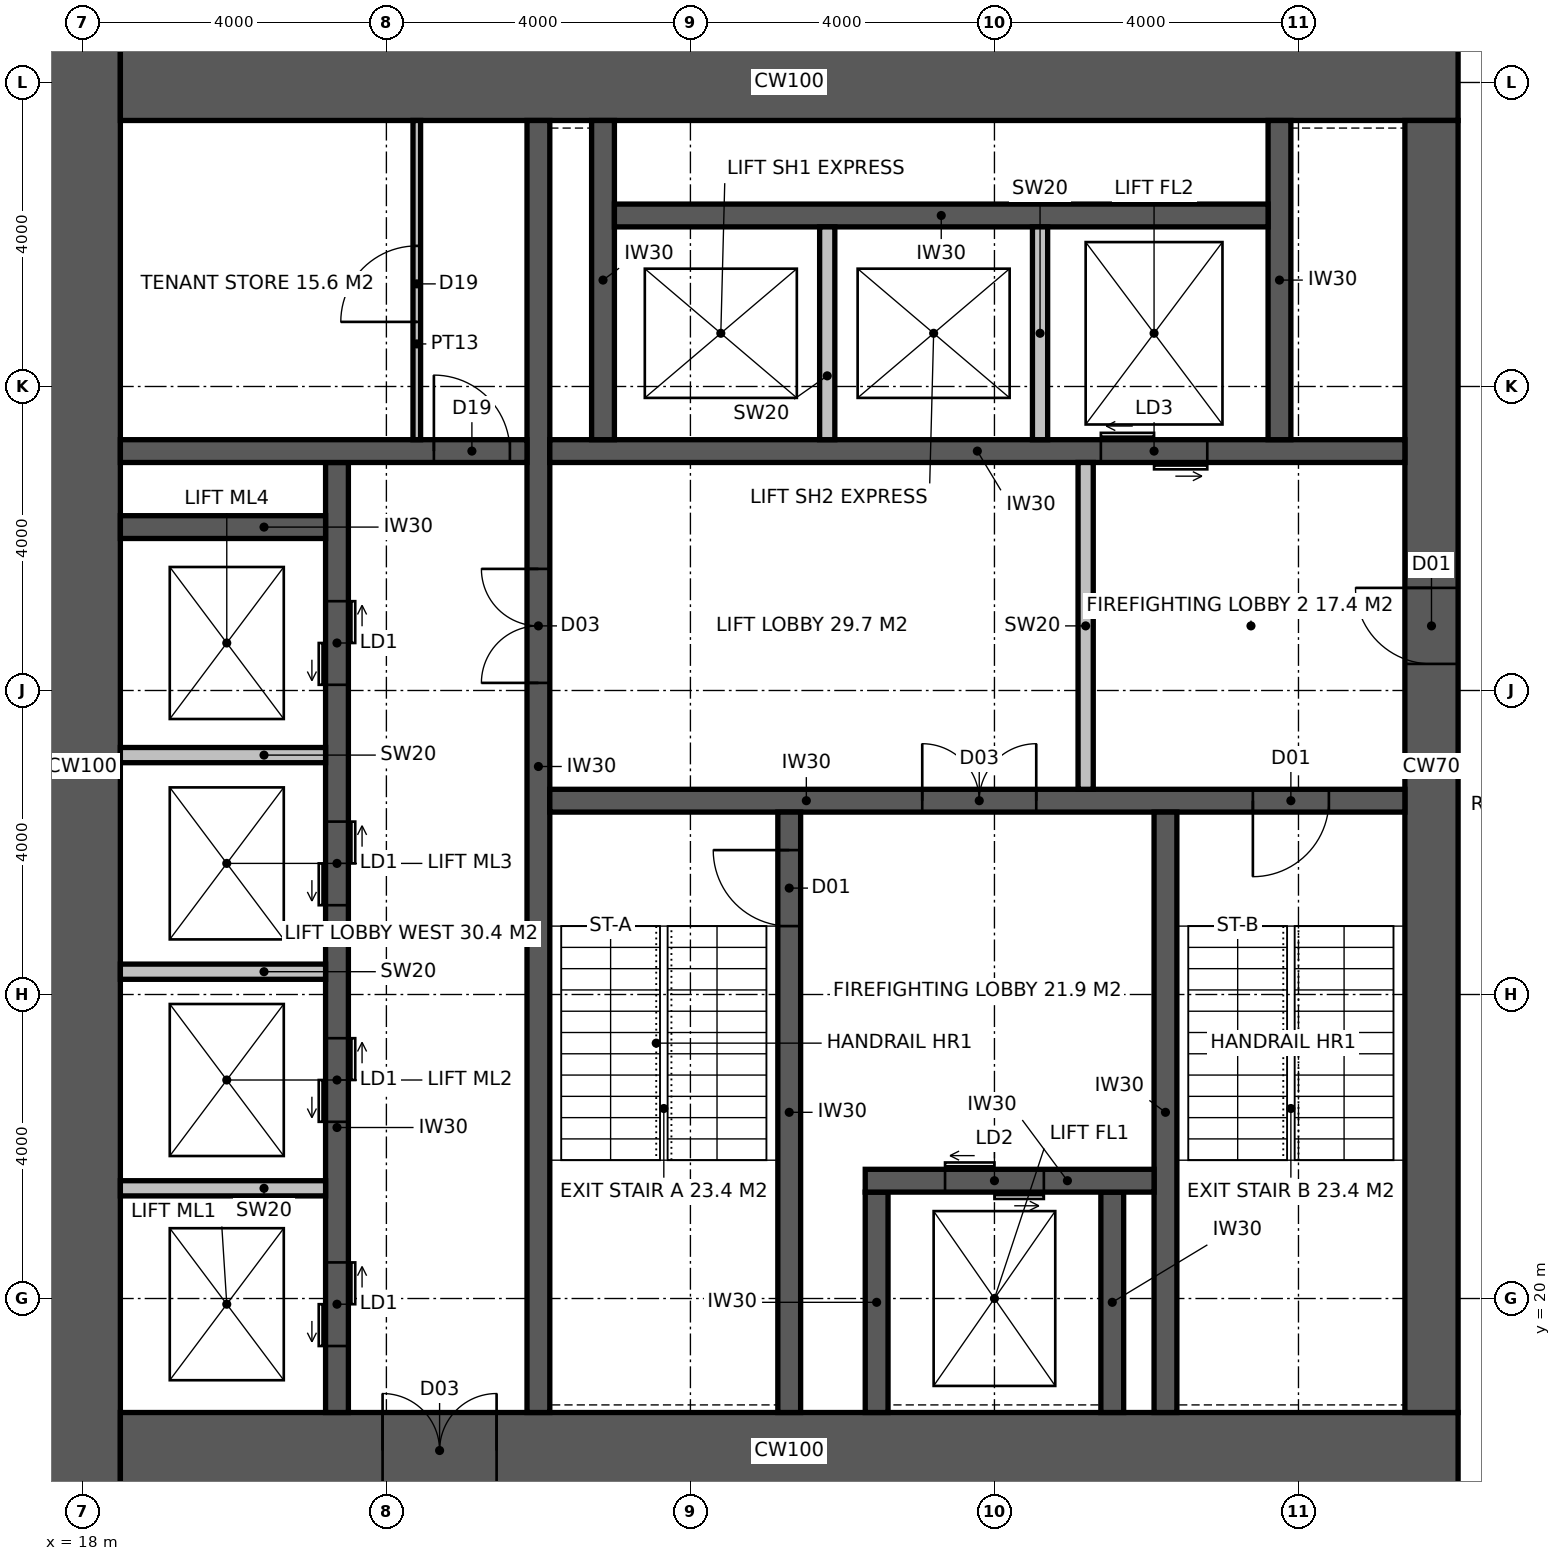
"""IFC4 building model, lengths in metres.
Left out: names, types, materials, properties, quantities, classifications, styles, units other than length and angle.
Written with IfcOpenShell. Run it as: python <this file> out.ifc"""

import sys

from ifc_helpers import new_model, si_unit, direction, frame, frame_2d, origin, place, context, subcontext, project, spatial, rectangle, extrude, element, fill, save


model = new_model("IFC4")
c1 = context("Model", 3, precision=1e-05, world=origin(), true_north=direction((0.0, 1.0)))
c2 = subcontext(c1, "Body", "Model", "MODEL_VIEW")
j1 = project(units=[si_unit("LENGTHUNIT", "METRE"), si_unit("PLANEANGLEUNIT", "RADIAN")], contexts=[c1])
p1 = place(None, origin())
s1 = spatial("IfcSite", under=j1, at=p1, CompositionType="ELEMENT")
p2 = place(p1, origin())
s2 = spatial("IfcBuilding", under=s1, at=p2, CompositionType="ELEMENT")
p3 = place(p2, frame((0.0, 0.0, 121.4)))
s3 = spatial("IfcBuildingStorey", under=s2, at=p3, CompositionType="ELEMENT", Elevation=121.4)
p4 = place(p3, frame((18.0, 17.5, -0.15), z_axis=(0.0, 0.0, 1.0), x_axis=(0.0, 1.0, 0.0)))
e1 = element("IfcWall", 1, at=p4, inside=s3, PredefinedType="SHEAR", context=c2, shape_type="SweptSolid", body=[
    extrude(rectangle(XDim=19.0, YDim=1.0, at=frame_2d((9.5, 0.0))), origin(), (0.0, 0.0, 1.0), 4.0),
])
p5 = place(p3, frame((18.5, 18.0, -0.15), z_axis=(0.0, 0.0, 1.0), x_axis=(1.0, 0.0, 0.0)))
e2 = element("IfcWall", 2, at=p5, inside=s3, PredefinedType="SHEAR", context=c2, shape_type="SweptSolid", body=[
    extrude(rectangle(XDim=17.6, YDim=1.0, at=frame_2d((8.8, 0.0))), origin(), (0.0, 0.0, 1.0), 4.0),
])
p6 = place(p5, frame((3.45, 0.0, 0.15)))
e3 = element("IfcOpeningElement", 3, at=p6, cuts=e2, PredefinedType="OPENING", context=c2, shape_type="SweptSolid", body=[
    extrude(rectangle(XDim=1.5, YDim=2.4, at=frame_2d((0.75, 1.2))), frame((0.0, 0.51, 0.0), z_axis=(0.0, -1.0, 0.0), x_axis=(1.0, 0.0, 0.0)), (0.0, 0.0, 1.0), 1.02),
])
p7 = place(p3, frame((18.5, 36.0, -0.15), z_axis=(0.0, 0.0, 1.0), x_axis=(1.0, 0.0, 0.0)))
e4 = element("IfcWall", 4, at=p7, inside=s3, PredefinedType="SHEAR", context=c2, shape_type="SweptSolid", body=[
    extrude(rectangle(XDim=17.6, YDim=1.0, at=frame_2d((8.8, 0.0))), origin(), (0.0, 0.0, 1.0), 4.0),
])
p8 = place(p3, frame((35.75, 18.5, -0.15), z_axis=(0.0, 0.0, 1.0), x_axis=(0.0, 1.0, 0.0)))
e5 = element("IfcWall", 5, at=p8, inside=s3, PredefinedType="SHEAR", context=c2, shape_type="SweptSolid", body=[
    extrude(rectangle(XDim=17.0, YDim=0.7, at=frame_2d((8.5, 0.0))), origin(), (0.0, 0.0, 1.0), 4.0),
])
p9 = place(p8, frame((9.85, 0.0, 0.15)))
e6 = element("IfcOpeningElement", 6, at=p9, cuts=e5, PredefinedType="OPENING", context=c2, shape_type="SweptSolid", body=[
    extrude(rectangle(XDim=1.0, YDim=2.2, at=frame_2d((0.5, 1.1))), frame((0.0, 0.36, 0.0), z_axis=(0.0, -1.0, 0.0), x_axis=(1.0, 0.0, 0.0)), (0.0, 0.0, 1.0), 0.72),
])
p10 = place(p3, frame((24.0, 18.5, -0.15), z_axis=(0.0, 0.0, 1.0), x_axis=(0.0, 1.0, 0.0)))
e7 = element("IfcWall", 7, at=p10, inside=s3, PredefinedType="SHEAR", context=c2, shape_type="SweptSolid", body=[
    extrude(rectangle(XDim=17.0, YDim=0.3, at=frame_2d((8.5, 0.0))), origin(), (0.0, 0.0, 1.0), 4.0),
])
p11 = place(p10, frame((9.6, 0.0, 0.15)))
e8 = element("IfcOpeningElement", 8, at=p11, cuts=e7, PredefinedType="OPENING", context=c2, shape_type="SweptSolid", body=[
    extrude(rectangle(XDim=1.5, YDim=2.4, at=frame_2d((0.75, 1.2))), frame((0.0, 0.16, 0.0), z_axis=(0.0, -1.0, 0.0), x_axis=(1.0, 0.0, 0.0)), (0.0, 0.0, 1.0), 0.32),
])
p12 = place(p3, frame((24.15, 26.55, -0.15), z_axis=(0.0, 0.0, 1.0), x_axis=(1.0, 0.0, 0.0)))
e9 = element("IfcWall", 9, at=p12, inside=s3, PredefinedType="SHEAR", context=c2, shape_type="SweptSolid", body=[
    extrude(rectangle(XDim=11.25, YDim=0.3, at=frame_2d((5.625, 0.0))), origin(), (0.0, 0.0, 1.0), 4.0),
])
p13 = place(p12, frame((9.25, 0.0, 0.15)))
e10 = element("IfcOpeningElement", 10, at=p13, cuts=e9, PredefinedType="OPENING", context=c2, shape_type="SweptSolid", body=[
    extrude(rectangle(XDim=1.0, YDim=2.2, at=frame_2d((0.5, 1.1))), frame((0.0, 0.16, 0.0), z_axis=(0.0, -1.0, 0.0), x_axis=(1.0, 0.0, 0.0)), (0.0, 0.0, 1.0), 0.32),
])
p14 = place(p12, frame((4.9, 0.0, 0.15)))
e11 = element("IfcOpeningElement", 11, at=p14, cuts=e9, PredefinedType="OPENING", context=c2, shape_type="SweptSolid", body=[
    extrude(rectangle(XDim=1.5, YDim=2.4, at=frame_2d((0.75, 1.2))), frame((0.0, 0.16, 0.0), z_axis=(0.0, -1.0, 0.0), x_axis=(1.0, 0.0, 0.0)), (0.0, 0.0, 1.0), 0.32),
])
p15 = place(p3, frame((27.3, 18.5, -0.15), z_axis=(0.0, 0.0, 1.0), x_axis=(0.0, 1.0, 0.0)))
e12 = element("IfcWall", 12, at=p15, inside=s3, PredefinedType="SHEAR", context=c2, shape_type="SweptSolid", body=[
    extrude(rectangle(XDim=7.9, YDim=0.3, at=frame_2d((3.95, 0.0))), origin(), (0.0, 0.0, 1.0), 4.0),
])
p16 = place(p15, frame((6.4, 0.0, 0.15)))
e13 = element("IfcOpeningElement", 13, at=p16, cuts=e12, PredefinedType="OPENING", context=c2, shape_type="SweptSolid", body=[
    extrude(rectangle(XDim=1.0, YDim=2.2, at=frame_2d((0.5, 1.1))), frame((0.0, 0.16, 0.0), z_axis=(0.0, -1.0, 0.0), x_axis=(1.0, 0.0, 0.0)), (0.0, 0.0, 1.0), 0.32),
])
p17 = place(p3, frame((32.25, 18.5, -0.15), z_axis=(0.0, 0.0, 1.0), x_axis=(0.0, 1.0, 0.0)))
e14 = element("IfcWall", 14, at=p17, inside=s3, PredefinedType="SHEAR", context=c2, shape_type="SweptSolid", body=[
    extrude(rectangle(XDim=7.9, YDim=0.3, at=frame_2d((3.95, 0.0))), origin(), (0.0, 0.0, 1.0), 4.0),
])
for number, where, z_axis, x_axis in (
    (15, (28.45, 18.5, -0.15), (0.0, 0.0, 1.0), (0.0, 1.0, 0.0)),
    (16, (31.55, 18.5, -0.15), (0.0, 0.0, 1.0), (0.0, 1.0, 0.0)),
):
    element("IfcWall", number, at=place(p3, frame(where, z_axis=z_axis, x_axis=x_axis)), inside=s3, PredefinedType="SHEAR", context=c2, shape_type="SweptSolid", body=[
        extrude(rectangle(XDim=2.9, YDim=0.3, at=frame_2d((1.45, 0.0))), origin(), (0.0, 0.0, 1.0), 4.0),
    ])
p18 = place(p3, frame((28.3, 21.55, -0.15), z_axis=(0.0, 0.0, 1.0), x_axis=(1.0, 0.0, 0.0)))
e17 = element("IfcWall", 17, at=p18, inside=s3, PredefinedType="SHEAR", context=c2, shape_type="SweptSolid", body=[
    extrude(rectangle(XDim=3.8, YDim=0.3, at=frame_2d((1.9, 0.0))), origin(), (0.0, 0.0, 1.0), 4.0),
])
p19 = place(p18, frame((1.05, 0.0, 0.15)))
e18 = element("IfcOpeningElement", 18, at=p19, cuts=e17, PredefinedType="OPENING", context=c2, shape_type="SweptSolid", body=[
    extrude(rectangle(XDim=1.3, YDim=2.4, at=frame_2d((0.65, 1.2))), frame((0.0, 0.16, 0.0), z_axis=(0.0, -1.0, 0.0), x_axis=(1.0, 0.0, 0.0)), (0.0, 0.0, 1.0), 0.32),
])
p20 = place(p3, frame((24.15, 31.15, -0.15), z_axis=(0.0, 0.0, 1.0), x_axis=(1.0, 0.0, 0.0)))
e19 = element("IfcWall", 19, at=p20, inside=s3, PredefinedType="SHEAR", context=c2, shape_type="SweptSolid", body=[
    extrude(rectangle(XDim=11.25, YDim=0.3, at=frame_2d((5.625, 0.0))), origin(), (0.0, 0.0, 1.0), 4.0),
])
p21 = place(p20, frame((7.25, 0.0, 0.15)))
e20 = element("IfcOpeningElement", 20, at=p21, cuts=e19, PredefinedType="OPENING", context=c2, shape_type="SweptSolid", body=[
    extrude(rectangle(XDim=1.4, YDim=2.4, at=frame_2d((0.7, 1.2))), frame((0.0, 0.16, 0.0), z_axis=(0.0, -1.0, 0.0), x_axis=(1.0, 0.0, 0.0)), (0.0, 0.0, 1.0), 0.32),
])
p22 = place(p3, frame((21.35, 18.5, -0.15), z_axis=(0.0, 0.0, 1.0), x_axis=(0.0, 1.0, 0.0)))
e21 = element("IfcWall", 21, at=p22, inside=s3, PredefinedType="SHEAR", context=c2, shape_type="SweptSolid", body=[
    extrude(rectangle(XDim=12.5, YDim=0.3, at=frame_2d((6.25, 0.0))), origin(), (0.0, 0.0, 1.0), 4.0),
])
p23 = place(p22, frame((0.875, 0.0, 0.15)))
e22 = element("IfcOpeningElement", 22, at=p23, cuts=e21, PredefinedType="OPENING", context=c2, shape_type="SweptSolid", body=[
    extrude(rectangle(XDim=1.1, YDim=2.2, at=frame_2d((0.55, 1.1))), frame((0.0, 0.16, 0.0), z_axis=(0.0, -1.0, 0.0), x_axis=(1.0, 0.0, 0.0)), (0.0, 0.0, 1.0), 0.32),
])
p24 = place(p22, frame((3.825, 0.0, 0.15)))
e23 = element("IfcOpeningElement", 23, at=p24, cuts=e21, PredefinedType="OPENING", context=c2, shape_type="SweptSolid", body=[
    extrude(rectangle(XDim=1.1, YDim=2.2, at=frame_2d((0.55, 1.1))), frame((0.0, 0.16, 0.0), z_axis=(0.0, -1.0, 0.0), x_axis=(1.0, 0.0, 0.0)), (0.0, 0.0, 1.0), 0.32),
])
p25 = place(p22, frame((6.675, 0.0, 0.15)))
e24 = element("IfcOpeningElement", 24, at=p25, cuts=e21, PredefinedType="OPENING", context=c2, shape_type="SweptSolid", body=[
    extrude(rectangle(XDim=1.1, YDim=2.2, at=frame_2d((0.55, 1.1))), frame((0.0, 0.16, 0.0), z_axis=(0.0, -1.0, 0.0), x_axis=(1.0, 0.0, 0.0)), (0.0, 0.0, 1.0), 0.32),
])
p26 = place(p22, frame((9.575, 0.0, 0.15)))
e25 = element("IfcOpeningElement", 25, at=p26, cuts=e21, PredefinedType="OPENING", context=c2, shape_type="SweptSolid", body=[
    extrude(rectangle(XDim=1.1, YDim=2.2, at=frame_2d((0.55, 1.1))), frame((0.0, 0.16, 0.0), z_axis=(0.0, -1.0, 0.0), x_axis=(1.0, 0.0, 0.0)), (0.0, 0.0, 1.0), 0.32),
])
p27 = place(p3, frame((18.5, 31.15, -0.15), z_axis=(0.0, 0.0, 1.0), x_axis=(1.0, 0.0, 0.0)))
e26 = element("IfcWall", 26, at=p27, inside=s3, PredefinedType="SHEAR", context=c2, shape_type="SweptSolid", body=[
    extrude(rectangle(XDim=5.35, YDim=0.3, at=frame_2d((2.675, 0.0))), origin(), (0.0, 0.0, 1.0), 4.0),
])
p28 = place(p27, frame((4.125, 0.0, 0.15)))
e27 = element("IfcOpeningElement", 27, at=p28, cuts=e26, PredefinedType="OPENING", context=c2, shape_type="SweptSolid", body=[
    extrude(rectangle(XDim=1.0, YDim=2.2, at=frame_2d((0.5, 1.1))), frame((0.0, 0.16, 0.0), z_axis=(0.0, -1.0, 0.0), x_axis=(1.0, 0.0, 0.0)), (0.0, 0.0, 1.0), 0.32),
])
p29 = place(p3, frame((18.5, 30.15, -0.15), z_axis=(0.0, 0.0, 1.0), x_axis=(1.0, 0.0, 0.0)))
e28 = element("IfcWall", 28, at=p29, inside=s3, PredefinedType="SHEAR", context=c2, shape_type="SweptSolid", body=[
    extrude(rectangle(XDim=2.7, YDim=0.3, at=frame_2d((1.35, 0.0))), origin(), (0.0, 0.0, 1.0), 4.0),
])
for number, where, z_axis, x_axis in (
    (29, (24.85, 31.3, -0.15), (0.0, 0.0, 1.0), (0.0, 1.0, 0.0)),
    (30, (33.75, 31.3, -0.15), (0.0, 0.0, 1.0), (0.0, 1.0, 0.0)),
):
    element("IfcWall", number, at=place(p3, frame(where, z_axis=z_axis, x_axis=x_axis)), inside=s3, PredefinedType="SHEAR", context=c2, shape_type="SweptSolid", body=[
        extrude(rectangle(XDim=4.2, YDim=0.3, at=frame_2d((2.1, 0.0))), origin(), (0.0, 0.0, 1.0), 4.0),
    ])
p30 = place(p3, frame((25.0, 34.25, -0.15), z_axis=(0.0, 0.0, 1.0), x_axis=(1.0, 0.0, 0.0)))
e31 = element("IfcWall", 31, at=p30, inside=s3, PredefinedType="SHEAR", context=c2, shape_type="SweptSolid", body=[
    extrude(rectangle(XDim=8.6, YDim=0.3, at=frame_2d((4.3, 0.0))), origin(), (0.0, 0.0, 1.0), 4.0),
])
for number, where, z_axis, x_axis in (
    (32, (27.8, 31.3, -0.15), (0.0, 0.0, 1.0), (0.0, 1.0, 0.0)),
    (33, (30.6, 31.3, -0.15), (0.0, 0.0, 1.0), (0.0, 1.0, 0.0)),
):
    element("IfcWall", number, at=place(p3, frame(where, z_axis=z_axis, x_axis=x_axis)), inside=s3, PredefinedType="SOLIDWALL", context=c2, shape_type="SweptSolid", body=[
        extrude(rectangle(XDim=2.8, YDim=0.2, at=frame_2d((1.4, 0.0))), origin(), (0.0, 0.0, 1.0), 4.0),
    ])
for number, where, z_axis, x_axis in (
    (34, (18.5, 21.45, -0.15), (0.0, 0.0, 1.0), (1.0, 0.0, 0.0)),
    (35, (18.5, 24.3, -0.15), (0.0, 0.0, 1.0), (1.0, 0.0, 0.0)),
    (36, (18.5, 27.15, -0.15), (0.0, 0.0, 1.0), (1.0, 0.0, 0.0)),
):
    element("IfcWall", number, at=place(p3, frame(where, z_axis=z_axis, x_axis=x_axis)), inside=s3, PredefinedType="SOLIDWALL", context=c2, shape_type="SweptSolid", body=[
        extrude(rectangle(XDim=2.7, YDim=0.2, at=frame_2d((1.35, 0.0))), origin(), (0.0, 0.0, 1.0), 4.0),
    ])
p31 = place(p3, frame((31.2, 26.7, 0.0), z_axis=(0.0, 0.0, 1.0), x_axis=(0.0, 1.0, 0.0)))
e37 = element("IfcWall", 37, at=p31, inside=s3, PredefinedType="SOLIDWALL", context=c2, shape_type="SweptSolid", body=[
    extrude(rectangle(XDim=4.3, YDim=0.2, at=frame_2d((2.15, 0.0))), origin(), (0.0, 0.0, 1.0), 3.85),
])
p32 = place(p3, frame((22.4, 31.3, 0.0), z_axis=(0.0, 0.0, 1.0), x_axis=(0.0, 1.0, 0.0)))
e38 = element("IfcWall", 38, at=p32, inside=s3, PredefinedType="PARTITIONING", context=c2, shape_type="SweptSolid", body=[
    extrude(rectangle(XDim=4.2, YDim=0.1, at=frame_2d((2.1, 0.0))), origin(), (0.0, 0.0, 1.0), 3.85),
])
p33 = place(p32, frame((1.55, 0.0, 0.0)))
e39 = element("IfcOpeningElement", 39, at=p33, cuts=e38, PredefinedType="OPENING", context=c2, shape_type="SweptSolid", body=[
    extrude(rectangle(XDim=1.0, YDim=2.2, at=frame_2d((0.5, 1.1))), frame((0.0, 0.06, 0.0), z_axis=(0.0, -1.0, 0.0), x_axis=(1.0, 0.0, 0.0)), (0.0, 0.0, 1.0), 0.12),
])
p34 = place(p16, origin())
e40 = element("IfcDoor", 40, at=p34, inside=s3, OperationType="SINGLE_SWING_RIGHT", PredefinedType="DOOR", context=c2, shape_type="SweptSolid", body=[
    extrude(rectangle(XDim=1.0, YDim=2.2, at=frame_2d((0.5, 1.1))), frame((0.0, 0.025, 0.0), z_axis=(0.0, -1.0, 0.0), x_axis=(1.0, 0.0, 0.0)), (0.0, 0.0, 1.0), 0.05),
])
fill(e13, e40)
p35 = place(p13, frame((1.0, 0.0, 0.0), z_axis=(0.0, 0.0, 1.0), x_axis=(-1.0, 0.0, 0.0)))
e41 = element("IfcDoor", 41, at=p35, inside=s3, OperationType="SINGLE_SWING_RIGHT", PredefinedType="DOOR", context=c2, shape_type="SweptSolid", body=[
    extrude(rectangle(XDim=1.0, YDim=2.2, at=frame_2d((0.5, 1.1))), frame((0.0, 0.025, 0.0), z_axis=(0.0, -1.0, 0.0), x_axis=(1.0, 0.0, 0.0)), (0.0, 0.0, 1.0), 0.05),
])
fill(e10, e41)
p36 = place(p9, origin())
e42 = element("IfcDoor", 42, at=p36, inside=s3, OperationType="SINGLE_SWING_RIGHT", PredefinedType="DOOR", context=c2, shape_type="SweptSolid", body=[
    extrude(rectangle(XDim=1.0, YDim=2.2, at=frame_2d((0.5, 1.1))), frame((0.0, 0.025, 0.0), z_axis=(0.0, -1.0, 0.0), x_axis=(1.0, 0.0, 0.0)), (0.0, 0.0, 1.0), 0.05),
])
fill(e6, e42)
p37 = place(p14, origin())
e43 = element("IfcDoor", 43, at=p37, inside=s3, OperationType="DOUBLE_DOOR_DOUBLE_SWING", PredefinedType="DOOR", context=c2, shape_type="SweptSolid", body=[
    extrude(rectangle(XDim=1.5, YDim=2.4, at=frame_2d((0.75, 1.2))), frame((0.0, 0.025, 0.0), z_axis=(0.0, -1.0, 0.0), x_axis=(1.0, 0.0, 0.0)), (0.0, 0.0, 1.0), 0.05),
])
fill(e11, e43)
p38 = place(p11, origin())
e44 = element("IfcDoor", 44, at=p38, inside=s3, OperationType="DOUBLE_DOOR_DOUBLE_SWING", PredefinedType="DOOR", context=c2, shape_type="SweptSolid", body=[
    extrude(rectangle(XDim=1.5, YDim=2.4, at=frame_2d((0.75, 1.2))), frame((0.0, 0.025, 0.0), z_axis=(0.0, -1.0, 0.0), x_axis=(1.0, 0.0, 0.0)), (0.0, 0.0, 1.0), 0.05),
])
fill(e8, e44)
p39 = place(p28, origin())
e45 = element("IfcDoor", 45, at=p39, inside=s3, OperationType="SINGLE_SWING_LEFT", PredefinedType="DOOR", context=c2, shape_type="SweptSolid", body=[
    extrude(rectangle(XDim=1.0, YDim=2.2, at=frame_2d((0.5, 1.1))), frame((0.0, 0.025, 0.0), z_axis=(0.0, -1.0, 0.0), x_axis=(1.0, 0.0, 0.0)), (0.0, 0.0, 1.0), 0.05),
])
fill(e27, e45)
p40 = place(p33, origin())
e46 = element("IfcDoor", 46, at=p40, inside=s3, OperationType="SINGLE_SWING_LEFT", PredefinedType="DOOR", context=c2, shape_type="SweptSolid", body=[
    extrude(rectangle(XDim=1.0, YDim=2.2, at=frame_2d((0.5, 1.1))), frame((0.0, 0.025, 0.0), z_axis=(0.0, -1.0, 0.0), x_axis=(1.0, 0.0, 0.0)), (0.0, 0.0, 1.0), 0.05),
])
fill(e39, e46)
p41 = place(p6, origin())
e47 = element("IfcDoor", 47, at=p41, inside=s3, OperationType="DOUBLE_DOOR_DOUBLE_SWING", PredefinedType="DOOR", context=c2, shape_type="SweptSolid", body=[
    extrude(rectangle(XDim=1.5, YDim=2.4, at=frame_2d((0.75, 1.2))), frame((0.0, 0.025, 0.0), z_axis=(0.0, -1.0, 0.0), x_axis=(1.0, 0.0, 0.0)), (0.0, 0.0, 1.0), 0.05),
])
fill(e3, e47)
p42 = place(p19, origin())
e48 = element("IfcDoor", 48, at=p42, inside=s3, OperationType="DOUBLE_DOOR_SLIDING", PredefinedType="DOOR", context=c2, shape_type="SweptSolid", body=[
    extrude(rectangle(XDim=1.3, YDim=2.4, at=frame_2d((0.65, 1.2))), frame((0.0, 0.025, 0.0), z_axis=(0.0, -1.0, 0.0), x_axis=(1.0, 0.0, 0.0)), (0.0, 0.0, 1.0), 0.05),
])
fill(e18, e48)
p43 = place(p21, origin())
e49 = element("IfcDoor", 49, at=p43, inside=s3, OperationType="DOUBLE_DOOR_SLIDING", PredefinedType="DOOR", context=c2, shape_type="SweptSolid", body=[
    extrude(rectangle(XDim=1.4, YDim=2.4, at=frame_2d((0.7, 1.2))), frame((0.0, 0.025, 0.0), z_axis=(0.0, -1.0, 0.0), x_axis=(1.0, 0.0, 0.0)), (0.0, 0.0, 1.0), 0.05),
])
fill(e20, e49)
p44 = place(p23, origin())
e50 = element("IfcDoor", 50, at=p44, inside=s3, OperationType="DOUBLE_DOOR_SLIDING", PredefinedType="DOOR", context=c2, shape_type="SweptSolid", body=[
    extrude(rectangle(XDim=1.1, YDim=2.2, at=frame_2d((0.55, 1.1))), frame((0.0, 0.025, 0.0), z_axis=(0.0, -1.0, 0.0), x_axis=(1.0, 0.0, 0.0)), (0.0, 0.0, 1.0), 0.05),
])
fill(e22, e50)
p45 = place(p24, origin())
e51 = element("IfcDoor", 51, at=p45, inside=s3, OperationType="DOUBLE_DOOR_SLIDING", PredefinedType="DOOR", context=c2, shape_type="SweptSolid", body=[
    extrude(rectangle(XDim=1.1, YDim=2.2, at=frame_2d((0.55, 1.1))), frame((0.0, 0.025, 0.0), z_axis=(0.0, -1.0, 0.0), x_axis=(1.0, 0.0, 0.0)), (0.0, 0.0, 1.0), 0.05),
])
fill(e23, e51)
p46 = place(p25, origin())
e52 = element("IfcDoor", 52, at=p46, inside=s3, OperationType="DOUBLE_DOOR_SLIDING", PredefinedType="DOOR", context=c2, shape_type="SweptSolid", body=[
    extrude(rectangle(XDim=1.1, YDim=2.2, at=frame_2d((0.55, 1.1))), frame((0.0, 0.025, 0.0), z_axis=(0.0, -1.0, 0.0), x_axis=(1.0, 0.0, 0.0)), (0.0, 0.0, 1.0), 0.05),
])
fill(e24, e52)
p47 = place(p26, origin())
e53 = element("IfcDoor", 53, at=p47, inside=s3, OperationType="DOUBLE_DOOR_SLIDING", PredefinedType="DOOR", context=c2, shape_type="SweptSolid", body=[
    extrude(rectangle(XDim=1.1, YDim=2.2, at=frame_2d((0.55, 1.1))), frame((0.0, 0.025, 0.0), z_axis=(0.0, -1.0, 0.0), x_axis=(1.0, 0.0, 0.0)), (0.0, 0.0, 1.0), 0.05),
])
fill(e25, e53)
save(model, sys.argv[1])
